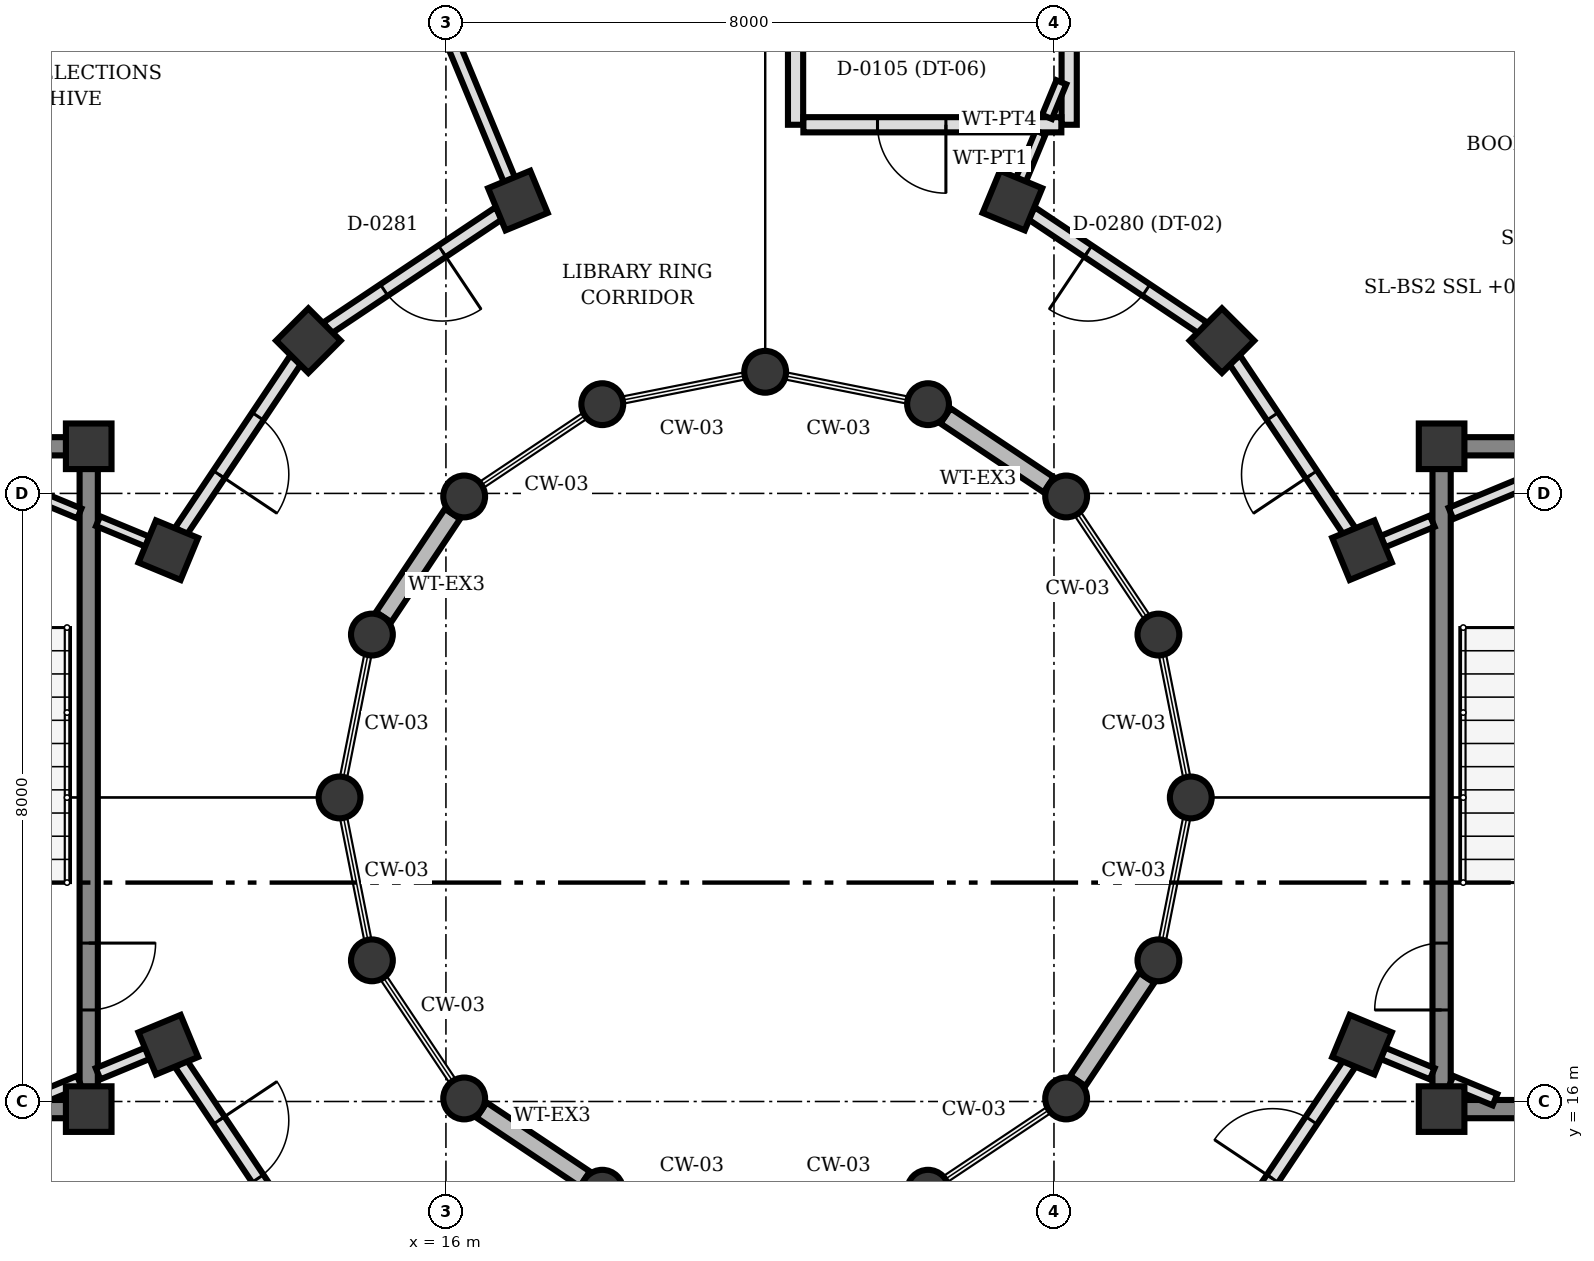
"""IFC4 building model, lengths in metres.
Left out: names, types, materials, properties, quantities, classifications, styles, units other than length and angle.
Written with IfcOpenShell. Run it as: python <this file> out.ifc"""

import sys

from ifc_helpers import new_model, si_unit, direction, frame, frame_2d, origin, origin_2d, place, context, subcontext, project, spatial, rectangle, circle, extrude, element, fill, save


model = new_model("IFC4")
c1 = context("Model", 3, precision=1e-05, world=origin(), true_north=direction((0.0, 1.0)))
c2 = subcontext(c1, "Body", "Model", "MODEL_VIEW")
j1 = project(units=[si_unit("LENGTHUNIT", "METRE"), si_unit("PLANEANGLEUNIT", "RADIAN")], contexts=[c1])
p1 = place(None, origin())
s1 = spatial("IfcSite", under=j1, at=p1, CompositionType="ELEMENT")
p2 = place(p1, origin())
s2 = spatial("IfcBuilding", under=s1, at=p2, CompositionType="ELEMENT")
p3 = place(p2, origin())
s3 = spatial("IfcBuildingStorey", under=s2, at=p3, CompositionType="ELEMENT", Elevation=0.0)
for number, where, z_axis, x_axis in (
    (1, (11.3, 15.9, 0.0), (0.0, 0.0, 1.0), (1.0, 0.0, 0.0)),
    (2, (11.3, 24.62, 0.0), (0.0, 0.0, 1.0), (1.0, 0.0, 0.0)),
    (3, (29.1, 15.9, 0.0), (0.0, 0.0, 1.0), (1.0, 0.0, 0.0)),
    (4, (29.1, 24.62, 0.0), (0.0, 0.0, 1.0), (1.0, 0.0, 0.0)),
):
    element("IfcColumn", number, at=place(p3, frame(where, z_axis=z_axis, x_axis=x_axis)), inside=s3, PredefinedType="COLUMN", context=c2, shape_type="SweptSolid", body=[
        extrude(rectangle(XDim=0.6, YDim=0.6, at=origin_2d()), origin(), (0.0, 0.0, 1.0), 4.5),
    ])
for number, where, z_axis, x_axis in (
    (5, (25.8, 20.0, 0.0), (0.0, 0.0, 1.0), (1.0, 0.0, 0.0)),
    (6, (25.374, 22.143, 0.0), (0.0, 0.0, 1.0), (1.0, 0.0, 0.0)),
    (7, (24.16, 23.96, 0.0), (0.0, 0.0, 1.0), (1.0, 0.0, 0.0)),
    (8, (22.343, 25.174, 0.0), (0.0, 0.0, 1.0), (1.0, 0.0, 0.0)),
    (9, (20.2, 25.6, 0.0), (0.0, 0.0, 1.0), (1.0, 0.0, 0.0)),
    (10, (18.057, 25.174, 0.0), (0.0, 0.0, 1.0), (1.0, 0.0, 0.0)),
    (11, (16.24, 23.96, 0.0), (0.0, 0.0, 1.0), (1.0, 0.0, 0.0)),
    (12, (15.026, 22.143, 0.0), (0.0, 0.0, 1.0), (1.0, 0.0, 0.0)),
    (13, (14.6, 20.0, 0.0), (0.0, 0.0, 1.0), (1.0, 0.0, 0.0)),
    (14, (15.026, 17.857, 0.0), (0.0, 0.0, 1.0), (1.0, 0.0, 0.0)),
    (15, (16.24, 16.04, 0.0), (0.0, 0.0, 1.0), (1.0, 0.0, 0.0)),
    (16, (18.057, 14.826, 0.0), (0.0, 0.0, 1.0), (1.0, 0.0, 0.0)),
    (17, (22.343, 14.826, 0.0), (0.0, 0.0, 1.0), (1.0, 0.0, 0.0)),
    (18, (24.16, 16.04, 0.0), (0.0, 0.0, 1.0), (1.0, 0.0, 0.0)),
    (19, (25.374, 17.857, 0.0), (0.0, 0.0, 1.0), (1.0, 0.0, 0.0)),
):
    element("IfcColumn", number, at=place(p3, frame(where, z_axis=z_axis, x_axis=x_axis)), inside=s3, PredefinedType="COLUMN", context=c2, shape_type="SweptSolid", body=[
        extrude(circle(Radius=0.275, at=origin_2d()), origin(), (0.0, 0.0, 1.0), 4.5),
    ])
for number, where, z_axis, x_axis in (
    (20, (28.053, 23.253, 0.0), (0.0, 0.0, 1.0), (0.924, 0.383, 0.0)),
    (21, (26.21, 26.01, 0.0), (0.0, 0.0, 1.0), (0.707, 0.707, 0.0)),
    (22, (23.453, 27.853, 0.0), (0.0, 0.0, 1.0), (0.383, 0.924, 0.0)),
    (23, (16.947, 27.853, 0.0), (0.0, 0.0, 1.0), (-0.383, 0.924, 0.0)),
    (24, (14.19, 26.01, 0.0), (0.0, 0.0, 1.0), (-0.707, 0.707, 0.0)),
    (25, (12.347, 23.253, 0.0), (0.0, 0.0, 1.0), (-0.924, 0.383, 0.0)),
    (26, (12.347, 16.747, 0.0), (0.0, 0.0, 1.0), (-0.924, -0.383, 0.0)),
    (27, (28.053, 16.747, 0.0), (0.0, 0.0, 1.0), (0.924, -0.383, 0.0)),
):
    element("IfcColumn", number, at=place(p3, frame(where, z_axis=z_axis, x_axis=x_axis)), inside=s3, PredefinedType="COLUMN", context=c2, shape_type="SweptSolid", body=[
        extrude(rectangle(XDim=0.6, YDim=0.6, at=origin_2d()), origin(), (0.0, 0.0, 1.0), 4.5),
    ])
for number, where, z_axis, x_axis in (
    (28, (23.93, 24.114, 0.0), (0.0, 0.0, 1.0), (-0.832, 0.555, 0.0)),
    (29, (16.086, 23.73, 0.0), (0.0, 0.0, 1.0), (-0.555, -0.832, 0.0)),
    (30, (16.47, 15.886, 0.0), (0.0, 0.0, 1.0), (0.832, -0.555, 0.0)),
    (31, (24.314, 16.27, 0.0), (0.0, 0.0, 1.0), (0.555, 0.832, 0.0)),
):
    element("IfcWall", number, at=place(p3, frame(where, z_axis=z_axis, x_axis=x_axis)), inside=s3, PredefinedType="SOLIDWALL", context=c2, shape_type="SweptSolid", body=[
        extrude(rectangle(XDim=1.632, YDim=0.24, at=frame_2d((0.816, 0.0))), origin(), (0.0, 0.0, 1.0), 3.55),
    ])
p4 = place(p3, frame((11.3, 24.328, 0.0), z_axis=(0.0, 0.0, 1.0), x_axis=(0.0, -1.0, 0.0)))
e32 = element("IfcWall", 32, at=p4, inside=s3, PredefinedType="SHEAR", context=c2, shape_type="SweptSolid", body=[
    extrude(rectangle(XDim=8.136, YDim=0.24, at=frame_2d((4.068, 0.0))), origin(), (0.0, 0.0, 1.0), 4.24),
])
p5 = place(p4, frame((6.244, 0.0, 0.0)))
e33 = element("IfcOpeningElement", 33, at=p5, cuts=e32, PredefinedType="OPENING", context=c2, shape_type="SweptSolid", body=[
    extrude(rectangle(XDim=0.88, YDim=2.1, at=frame_2d((0.44, 1.05))), frame((0.0, 0.13, 0.0), z_axis=(0.0, -1.0, 0.0), x_axis=(1.0, 0.0, 0.0)), (0.0, 0.0, 1.0), 0.26),
])
for number, where, z_axis, x_axis in (
    (34, (11.008, 15.9, 0.0), (0.0, 0.0, 1.0), (-1.0, 0.0, 0.0)),
    (35, (11.008, 24.62, 0.0), (0.0, 0.0, 1.0), (-1.0, 0.0, 0.0)),
):
    element("IfcWall", number, at=place(p3, frame(where, z_axis=z_axis, x_axis=x_axis)), inside=s3, PredefinedType="SHEAR", context=c2, shape_type="SweptSolid", body=[
        extrude(rectangle(XDim=4.216, YDim=0.24, at=frame_2d((2.108, 0.0))), origin(), (0.0, 0.0, 1.0), 4.24),
    ])
p6 = place(p3, frame((29.1, 16.192, 0.0), z_axis=(0.0, 0.0, 1.0), x_axis=(0.0, 1.0, 0.0)))
e36 = element("IfcWall", 36, at=p6, inside=s3, PredefinedType="SHEAR", context=c2, shape_type="SweptSolid", body=[
    extrude(rectangle(XDim=8.136, YDim=0.24, at=frame_2d((4.068, 0.0))), origin(), (0.0, 0.0, 1.0), 4.24),
])
p7 = place(p6, frame((1.012, 0.0, 0.0)))
e37 = element("IfcOpeningElement", 37, at=p7, cuts=e36, PredefinedType="OPENING", context=c2, shape_type="SweptSolid", body=[
    extrude(rectangle(XDim=0.88, YDim=2.1, at=frame_2d((0.44, 1.05))), frame((0.0, 0.13, 0.0), z_axis=(0.0, -1.0, 0.0), x_axis=(1.0, 0.0, 0.0)), (0.0, 0.0, 1.0), 0.26),
])
for number, where, z_axis, x_axis in (
    (38, (33.608, 15.9, 0.0), (0.0, 0.0, 1.0), (-1.0, 0.0, 0.0)),
    (39, (33.608, 24.62, 0.0), (0.0, 0.0, 1.0), (-1.0, 0.0, 0.0)),
):
    element("IfcWall", number, at=place(p3, frame(where, z_axis=z_axis, x_axis=x_axis)), inside=s3, PredefinedType="SHEAR", context=c2, shape_type="SweptSolid", body=[
        extrude(rectangle(XDim=4.216, YDim=0.24, at=frame_2d((2.108, 0.0))), origin(), (0.0, 0.0, 1.0), 4.24),
    ])
p8 = place(p3, frame((20.6, 28.85, 0.0), z_axis=(0.0, 0.0, 1.0), x_axis=(0.0, 1.0, 0.0)))
e40 = element("IfcWall", 40, at=p8, inside=s3, PredefinedType="PARTITIONING", context=c2, shape_type="SweptSolid", body=[
    extrude(rectangle(XDim=3.283, YDim=0.2, at=frame_2d((1.642, 0.0))), origin(), (0.0, 0.0, 1.0), 4.2),
])
p9 = place(p3, frame((24.2, 28.85, 0.0), z_axis=(0.0, 0.0, 1.0), x_axis=(0.0, 1.0, 0.0)))
e41 = element("IfcWall", 41, at=p9, inside=s3, PredefinedType="PARTITIONING", context=c2, shape_type="SweptSolid", body=[
    extrude(rectangle(XDim=3.447, YDim=0.2, at=frame_2d((1.724, 0.0))), origin(), (0.0, 0.0, 1.0), 3.552),
])
p10 = place(p3, frame((24.097, 28.85, 0.0), z_axis=(0.0, 0.0, 1.0), x_axis=(-1.0, 0.0, 0.0)))
e42 = element("IfcWall", 42, at=p10, inside=s3, PredefinedType="PARTITIONING", context=c2, shape_type="SweptSolid", body=[
    extrude(rectangle(XDim=3.394, YDim=0.2, at=frame_2d((1.697, 0.0))), origin(), (0.0, 0.0, 1.0), 3.552),
])
p11 = place(p10, frame((1.519, 0.0, 0.0)))
e43 = element("IfcOpeningElement", 43, at=p11, cuts=e42, PredefinedType="OPENING", context=c2, shape_type="SweptSolid", body=[
    extrude(rectangle(XDim=0.9, YDim=2.2, at=frame_2d((0.45, 1.1))), frame((0.0, 0.11, 0.0), z_axis=(0.0, -1.0, 0.0), x_axis=(1.0, 0.0, 0.0)), (0.0, 0.0, 1.0), 0.22),
])
p12 = place(p3, frame((28.323, 23.364, 0.0), z_axis=(0.0, 0.0, 1.0), x_axis=(0.923840285319, 0.382778169729, 0.0)))
e44 = element("IfcWall", 44, at=p12, inside=s3, PredefinedType="PARTITIONING", context=c2, shape_type="SweptSolid", body=[
    extrude(rectangle(XDim=0.708, YDim=0.16, at=frame_2d((0.354, 0.0))), origin(), (0.0, 0.0, 1.0), 4.2),
])
p13 = place(p3, frame((29.223, 23.737, 0.0), z_axis=(0.0, 0.0, 1.0), x_axis=(0.923817443679, 0.382833293686, 0.0)))
e45 = element("IfcWall", 45, at=p13, inside=s3, PredefinedType="PARTITIONING", context=c2, shape_type="SweptSolid", body=[
    extrude(rectangle(XDim=1.985, YDim=0.16, at=frame_2d((0.993, 0.0))), origin(), (0.0, 0.0, 1.0), 4.2),
])
p14 = place(p3, frame((23.564, 28.123, 0.0), z_axis=(0.0, 0.0, 1.0), x_axis=(0.383383487336, 0.923589249417, 0.0)))
e46 = element("IfcWall", 46, at=p14, inside=s3, PredefinedType="PARTITIONING", context=c2, shape_type="SweptSolid", body=[
    extrude(rectangle(XDim=0.676, YDim=0.14, at=frame_2d((0.338, 0.0))), origin(), (0.0, 0.0, 1.0), 3.552),
])
p15 = place(p3, frame((23.908, 28.953, 0.0), z_axis=(0.0, 0.0, 1.0), x_axis=(0.3827885685, 0.92383597669, 0.0)))
e47 = element("IfcWall", 47, at=p15, inside=s3, PredefinedType="PARTITIONING", context=c2, shape_type="SweptSolid", body=[
    extrude(rectangle(XDim=0.494, YDim=0.14, at=frame_2d((0.247, 0.0))), origin(), (0.0, 0.0, 1.0), 3.552),
])
p16 = place(p3, frame((16.836, 28.123, 0.0), z_axis=(0.0, 0.0, 1.0), x_axis=(-0.382780060664, 0.923839501839, 0.0)))
e48 = element("IfcWall", 48, at=p16, inside=s3, PredefinedType="PARTITIONING", context=c2, shape_type="SweptSolid", body=[
    extrude(rectangle(XDim=8.391, YDim=0.16, at=frame_2d((4.196, 0.0))), origin(), (0.0, 0.0, 1.0), 3.552),
])
p17 = place(p3, frame((12.077, 23.364, 0.0), z_axis=(0.0, 0.0, 1.0), x_axis=(-0.923789734747, 0.382900151445, 0.0)))
e49 = element("IfcWall", 49, at=p17, inside=s3, PredefinedType="PARTITIONING", context=c2, shape_type="SweptSolid", body=[
    extrude(rectangle(XDim=0.708, YDim=0.14, at=frame_2d((0.354, 0.0))), origin(), (0.0, 0.0, 1.0), 4.2),
])
p18 = place(p3, frame((11.177, 23.737, 0.0), z_axis=(0.0, 0.0, 1.0), x_axis=(-0.923817443679, 0.382833293686, 0.0)))
e50 = element("IfcWall", 50, at=p18, inside=s3, PredefinedType="PARTITIONING", context=c2, shape_type="SweptSolid", body=[
    extrude(rectangle(XDim=1.985, YDim=0.14, at=frame_2d((0.993, 0.0))), origin(), (0.0, 0.0, 1.0), 4.2),
])
p19 = place(p3, frame((12.077, 16.636, 0.0), z_axis=(0.0, 0.0, 1.0), x_axis=(-0.923789734747, -0.382900151445, 0.0)))
e51 = element("IfcWall", 51, at=p19, inside=s3, PredefinedType="PARTITIONING", context=c2, shape_type="SweptSolid", body=[
    extrude(rectangle(XDim=0.708, YDim=0.16, at=frame_2d((0.354, 0.0))), origin(), (0.0, 0.0, 1.0), 3.552),
])
p20 = place(p3, frame((11.177, 16.263, 0.0), z_axis=(0.0, 0.0, 1.0), x_axis=(-0.923812676193, -0.382844797933, 0.0)))
e52 = element("IfcWall", 52, at=p20, inside=s3, PredefinedType="PARTITIONING", context=c2, shape_type="SweptSolid", body=[
    extrude(rectangle(XDim=0.627, YDim=0.16, at=frame_2d((0.313, 0.0))), origin(), (0.0, 0.0, 1.0), 3.552),
])
p21 = place(p3, frame((28.323, 16.636, 0.0), z_axis=(0.0, 0.0, 1.0), x_axis=(0.923840285319, -0.382778169729, 0.0)))
e53 = element("IfcWall", 53, at=p21, inside=s3, PredefinedType="PARTITIONING", context=c2, shape_type="SweptSolid", body=[
    extrude(rectangle(XDim=0.708, YDim=0.16, at=frame_2d((0.354, 0.0))), origin(), (0.0, 0.0, 1.0), 3.552),
])
p22 = place(p3, frame((29.223, 16.263, 0.0), z_axis=(0.0, 0.0, 1.0), x_axis=(0.923812676193, -0.382844797933, 0.0)))
e54 = element("IfcWall", 54, at=p22, inside=s3, PredefinedType="PARTITIONING", context=c2, shape_type="SweptSolid", body=[
    extrude(rectangle(XDim=0.627, YDim=0.16, at=frame_2d((0.313, 0.0))), origin(), (0.0, 0.0, 1.0), 3.552),
])
p23 = place(p3, frame((27.888, 23.501, 0.0), z_axis=(0.0, 0.0, 1.0), x_axis=(-0.556128339679, 0.831096426298, 0.0)))
e55 = element("IfcWall", 55, at=p23, inside=s3, PredefinedType="PARTITIONING", context=c2, shape_type="SweptSolid", body=[
    extrude(rectangle(XDim=2.72, YDim=0.18, at=frame_2d((1.36, 0.0))), origin(), (0.0, 0.0, 1.0), 3.552),
])
p24 = place(p23, frame((0.9, 0.0, 0.0)))
e56 = element("IfcOpeningElement", 56, at=p24, cuts=e55, PredefinedType="OPENING", context=c2, shape_type="SweptSolid", body=[
    extrude(rectangle(XDim=0.92, YDim=2.1, at=frame_2d((0.46, 1.05))), frame((0.0, 0.1, 0.0), z_axis=(0.0, -1.0, 0.0), x_axis=(1.0, 0.0, 0.0)), (0.0, 0.0, 1.0), 0.2),
])
p25 = place(p3, frame((25.962, 26.175, 0.0), z_axis=(0.0, 0.0, 1.0), x_axis=(-0.831096426298, 0.556128339679, 0.0)))
e57 = element("IfcWall", 57, at=p25, inside=s3, PredefinedType="PARTITIONING", context=c2, shape_type="SweptSolid", body=[
    extrude(rectangle(XDim=2.72, YDim=0.18, at=frame_2d((1.36, 0.0))), origin(), (0.0, 0.0, 1.0), 3.552),
])
p26 = place(p25, frame((0.9, 0.0, 0.0)))
e58 = element("IfcOpeningElement", 58, at=p26, cuts=e57, PredefinedType="OPENING", context=c2, shape_type="SweptSolid", body=[
    extrude(rectangle(XDim=0.92, YDim=2.1, at=frame_2d((0.46, 1.05))), frame((0.0, 0.1, 0.0), z_axis=(0.0, -1.0, 0.0), x_axis=(1.0, 0.0, 0.0)), (0.0, 0.0, 1.0), 0.2),
])
p27 = place(p3, frame((16.699, 27.688, 0.0), z_axis=(0.0, 0.0, 1.0), x_axis=(-0.831096426298, -0.556128339679, 0.0)))
e59 = element("IfcWall", 59, at=p27, inside=s3, PredefinedType="PARTITIONING", context=c2, shape_type="SweptSolid", body=[
    extrude(rectangle(XDim=2.72, YDim=0.18, at=frame_2d((1.36, 0.0))), origin(), (0.0, 0.0, 1.0), 3.552),
])
p28 = place(p27, frame((0.9, 0.0, 0.0)))
e60 = element("IfcOpeningElement", 60, at=p28, cuts=e59, PredefinedType="OPENING", context=c2, shape_type="SweptSolid", body=[
    extrude(rectangle(XDim=0.92, YDim=2.1, at=frame_2d((0.46, 1.05))), frame((0.0, 0.1, 0.0), z_axis=(0.0, -1.0, 0.0), x_axis=(1.0, 0.0, 0.0)), (0.0, 0.0, 1.0), 0.2),
])
p29 = place(p3, frame((14.025, 25.762, 0.0), z_axis=(0.0, 0.0, 1.0), x_axis=(-0.556128339679, -0.831096426298, 0.0)))
e61 = element("IfcWall", 61, at=p29, inside=s3, PredefinedType="PARTITIONING", context=c2, shape_type="SweptSolid", body=[
    extrude(rectangle(XDim=2.72, YDim=0.18, at=frame_2d((1.36, 0.0))), origin(), (0.0, 0.0, 1.0), 3.552),
])
p30 = place(p29, frame((0.9, 0.0, 0.0)))
e62 = element("IfcOpeningElement", 62, at=p30, cuts=e61, PredefinedType="OPENING", context=c2, shape_type="SweptSolid", body=[
    extrude(rectangle(XDim=0.92, YDim=2.1, at=frame_2d((0.46, 1.05))), frame((0.0, 0.1, 0.0), z_axis=(0.0, -1.0, 0.0), x_axis=(1.0, 0.0, 0.0)), (0.0, 0.0, 1.0), 0.2),
])
p31 = place(p3, frame((12.512, 16.499, 0.0), z_axis=(0.0, 0.0, 1.0), x_axis=(0.556128339679, -0.831096426298, 0.0)))
e63 = element("IfcWall", 63, at=p31, inside=s3, PredefinedType="PARTITIONING", context=c2, shape_type="SweptSolid", body=[
    extrude(rectangle(XDim=2.72, YDim=0.18, at=frame_2d((1.36, 0.0))), origin(), (0.0, 0.0, 1.0), 3.552),
])
p32 = place(p31, frame((0.9, 0.0, 0.0)))
e64 = element("IfcOpeningElement", 64, at=p32, cuts=e63, PredefinedType="OPENING", context=c2, shape_type="SweptSolid", body=[
    extrude(rectangle(XDim=0.92, YDim=2.1, at=frame_2d((0.46, 1.05))), frame((0.0, 0.1, 0.0), z_axis=(0.0, -1.0, 0.0), x_axis=(1.0, 0.0, 0.0)), (0.0, 0.0, 1.0), 0.2),
])
p33 = place(p3, frame((26.375, 14.238, 0.0), z_axis=(0.0, 0.0, 1.0), x_axis=(0.556128339679, 0.831096426298, 0.0)))
e65 = element("IfcWall", 65, at=p33, inside=s3, PredefinedType="PARTITIONING", context=c2, shape_type="SweptSolid", body=[
    extrude(rectangle(XDim=2.72, YDim=0.18, at=frame_2d((1.36, 0.0))), origin(), (0.0, 0.0, 1.0), 3.552),
])
p34 = place(p33, frame((0.9, 0.0, 0.0)))
e66 = element("IfcOpeningElement", 66, at=p34, cuts=e65, PredefinedType="OPENING", context=c2, shape_type="SweptSolid", body=[
    extrude(rectangle(XDim=0.92, YDim=2.1, at=frame_2d((0.46, 1.05))), frame((0.0, 0.1, 0.0), z_axis=(0.0, -1.0, 0.0), x_axis=(1.0, 0.0, 0.0)), (0.0, 0.0, 1.0), 0.2),
])
p35 = place(p5, origin())
e67 = element("IfcDoor", 67, at=p35, inside=s3, OperationType="SINGLE_SWING_LEFT", PredefinedType="DOOR", context=c2, shape_type="SweptSolid", body=[
    extrude(rectangle(XDim=0.88, YDim=2.1, at=frame_2d((0.44, 1.05))), frame((0.0, 0.025, 0.0), z_axis=(0.0, -1.0, 0.0), x_axis=(1.0, 0.0, 0.0)), (0.0, 0.0, 1.0), 0.05),
])
fill(e33, e67)
p36 = place(p7, origin())
e68 = element("IfcDoor", 68, at=p36, inside=s3, OperationType="SINGLE_SWING_LEFT", PredefinedType="DOOR", context=c2, shape_type="SweptSolid", body=[
    extrude(rectangle(XDim=0.88, YDim=2.1, at=frame_2d((0.44, 1.05))), frame((0.0, 0.025, 0.0), z_axis=(0.0, -1.0, 0.0), x_axis=(1.0, 0.0, 0.0)), (0.0, 0.0, 1.0), 0.05),
])
fill(e37, e68)
p37 = place(p11, origin())
e69 = element("IfcDoor", 69, at=p37, inside=s3, OperationType="SINGLE_SWING_LEFT", PredefinedType="DOOR", context=c2, shape_type="SweptSolid", body=[
    extrude(rectangle(XDim=0.9, YDim=2.2, at=frame_2d((0.45, 1.1))), frame((0.0, 0.025, 0.0), z_axis=(0.0, -1.0, 0.0), x_axis=(1.0, 0.0, 0.0)), (0.0, 0.0, 1.0), 0.05),
])
fill(e43, e69)
p38 = place(p24, origin())
e70 = element("IfcDoor", 70, at=p38, inside=s3, OperationType="SINGLE_SWING_LEFT", PredefinedType="DOOR", context=c2, shape_type="SweptSolid", body=[
    extrude(rectangle(XDim=0.92, YDim=2.1, at=frame_2d((0.46, 1.05))), frame((0.0, 0.025, 0.0), z_axis=(0.0, -1.0, 0.0), x_axis=(1.0, 0.0, 0.0)), (0.0, 0.0, 1.0), 0.05),
])
fill(e56, e70)
p39 = place(p26, origin())
e71 = element("IfcDoor", 71, at=p39, inside=s3, OperationType="SINGLE_SWING_RIGHT", PredefinedType="DOOR", context=c2, shape_type="SweptSolid", body=[
    extrude(rectangle(XDim=0.92, YDim=2.1, at=frame_2d((0.46, 1.05))), frame((0.0, 0.025, 0.0), z_axis=(0.0, -1.0, 0.0), x_axis=(1.0, 0.0, 0.0)), (0.0, 0.0, 1.0), 0.05),
])
fill(e58, e71)
p40 = place(p28, origin())
e72 = element("IfcDoor", 72, at=p40, inside=s3, OperationType="SINGLE_SWING_LEFT", PredefinedType="DOOR", context=c2, shape_type="SweptSolid", body=[
    extrude(rectangle(XDim=0.92, YDim=2.1, at=frame_2d((0.46, 1.05))), frame((0.0, 0.025, 0.0), z_axis=(0.0, -1.0, 0.0), x_axis=(1.0, 0.0, 0.0)), (0.0, 0.0, 1.0), 0.05),
])
fill(e60, e72)
p41 = place(p30, origin())
e73 = element("IfcDoor", 73, at=p41, inside=s3, OperationType="SINGLE_SWING_RIGHT", PredefinedType="DOOR", context=c2, shape_type="SweptSolid", body=[
    extrude(rectangle(XDim=0.92, YDim=2.1, at=frame_2d((0.46, 1.05))), frame((0.0, 0.025, 0.0), z_axis=(0.0, -1.0, 0.0), x_axis=(1.0, 0.0, 0.0)), (0.0, 0.0, 1.0), 0.05),
])
fill(e62, e73)
p42 = place(p32, origin())
e74 = element("IfcDoor", 74, at=p42, inside=s3, OperationType="SINGLE_SWING_LEFT", PredefinedType="DOOR", context=c2, shape_type="SweptSolid", body=[
    extrude(rectangle(XDim=0.92, YDim=2.1, at=frame_2d((0.46, 1.05))), frame((0.0, 0.025, 0.0), z_axis=(0.0, -1.0, 0.0), x_axis=(1.0, 0.0, 0.0)), (0.0, 0.0, 1.0), 0.05),
])
fill(e64, e74)
p43 = place(p34, origin())
e75 = element("IfcDoor", 75, at=p43, inside=s3, OperationType="SINGLE_SWING_LEFT", PredefinedType="DOOR", context=c2, shape_type="SweptSolid", body=[
    extrude(rectangle(XDim=0.92, YDim=2.1, at=frame_2d((0.46, 1.05))), frame((0.0, 0.025, 0.0), z_axis=(0.0, -1.0, 0.0), x_axis=(1.0, 0.0, 0.0)), (0.0, 0.0, 1.0), 0.05),
])
fill(e66, e75)
save(model, sys.argv[1])
